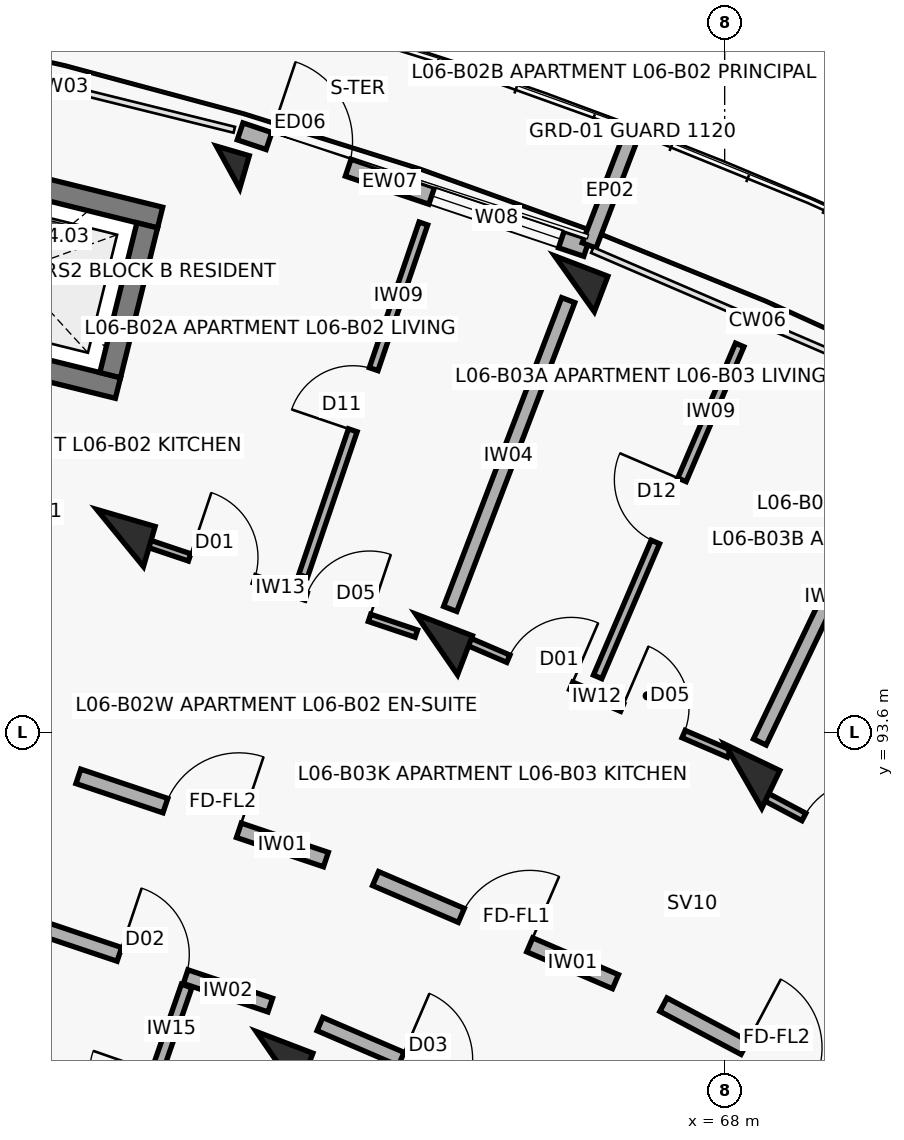
"""IFC4 building model, lengths in metres.
Left out: names, types, materials, properties, quantities, classifications, styles, units other than length and angle.
Written with IfcOpenShell. Run it as: python <this file> out.ifc"""

import sys

from ifc_helpers import new_model, si_unit, direction, frame, frame_2d, origin, origin_2d, place, context, subcontext, project, spatial, rectangle, extrude, element, fill, save


model = new_model("IFC4")
c1 = context("Model", 3, precision=1e-05, world=origin(), true_north=direction((0.0, 1.0)))
c2 = subcontext(c1, "Body", "Model", "MODEL_VIEW")
j1 = project(units=[si_unit("LENGTHUNIT", "METRE"), si_unit("PLANEANGLEUNIT", "RADIAN")], contexts=[c1])
p1 = place(None, origin())
s1 = spatial("IfcSite", under=j1, at=p1, CompositionType="ELEMENT")
p2 = place(p1, origin())
s2 = spatial("IfcBuilding", under=s1, at=p2, CompositionType="ELEMENT")
p3 = place(p2, frame((0.0, 0.0, 20.5)))
s3 = spatial("IfcBuildingStorey", under=s2, at=p3, CompositionType="ELEMENT", Elevation=20.5)
p4 = place(p3, frame((60.046, 96.153, 0.0), z_axis=(0.0, 0.0, 1.0), x_axis=(0.27966144946, 0.96009867914, 0.0)))
e1 = element("IfcColumn", 1, at=p4, inside=s3, PredefinedType="COLUMN", context=c2, shape_type="SweptSolid", body=[
    extrude(rectangle(XDim=0.55, YDim=0.8, at=origin_2d()), origin(), (0.0, 0.0, 1.0), 3.1),
])
p5 = place(p3, frame((61.467, 101.031, 0.0), z_axis=(0.0, 0.0, 1.0), x_axis=(0.27966144946, 0.96009867914, 0.0)))
e2 = element("IfcColumn", 2, at=p5, inside=s3, PredefinedType="COLUMN", context=c2, shape_type="SweptSolid", body=[
    extrude(rectangle(XDim=0.45, YDim=0.45, at=origin_2d()), origin(), (0.0, 0.0, 1.0), 3.1),
])
for number, where, z_axis, x_axis in (
    (3, (62.111, 89.261, 0.0), (0.0, 0.0, 1.0), (0.357, 0.934, 0.0)),
    (4, (64.21, 94.753, 0.0), (0.0, 0.0, 1.0), (0.357, 0.934, 0.0)),
):
    element("IfcColumn", number, at=place(p3, frame(where, z_axis=z_axis, x_axis=x_axis)), inside=s3, PredefinedType="COLUMN", context=c2, shape_type="SweptSolid", body=[
        extrude(rectangle(XDim=0.55, YDim=0.8, at=origin_2d()), origin(), (0.0, 0.0, 1.0), 3.1),
    ])
p6 = place(p3, frame((66.024, 99.499, 0.0), z_axis=(0.0, 0.0, 1.0), x_axis=(0.357064076459, 0.934079892355, 0.0)))
e5 = element("IfcColumn", 5, at=p6, inside=s3, PredefinedType="COLUMN", context=c2, shape_type="SweptSolid", body=[
    extrude(rectangle(XDim=0.5, YDim=0.75, at=origin_2d()), origin(), (0.0, 0.0, 1.0), 3.1),
])
p7 = place(p3, frame((68.246, 93.019, 0.0), z_axis=(0.0, 0.0, 1.0), x_axis=(0.432085748802, 0.901832526405, 0.0)))
e6 = element("IfcColumn", 6, at=p7, inside=s3, PredefinedType="COLUMN", context=c2, shape_type="SweptSolid", body=[
    extrude(rectangle(XDim=0.55, YDim=0.8, at=origin_2d()), origin(), (0.0, 0.0, 1.0), 3.1),
])
p8 = place(p3, frame((61.625, 101.504, 0.0), z_axis=(0.0, 0.0, 1.0), x_axis=(0.947867898788, -0.318663531717, 0.0)))
e7 = element("IfcWall", 7, at=p8, inside=s3, PredefinedType="SOLIDWALL", context=c2, shape_type="SweptSolid", body=[
    extrude(rectangle(XDim=4.809, YDim=0.235, at=frame_2d((2.405, 0.0))), origin(), (0.0, 0.0, 1.0), 2.25),
])
p9 = place(p8, frame((0.4, 0.0, 0.0)))
e8 = element("IfcOpeningElement", 8, at=p9, cuts=e7, PredefinedType="OPENING", context=c2, shape_type="SweptSolid", body=[
    extrude(rectangle(XDim=1.1, YDim=2.15, at=frame_2d((0.55, 1.075))), frame((0.0, 0.127, 0.0), z_axis=(0.0, -1.0, 0.0), x_axis=(1.0, 0.0, 0.0)), (0.0, 0.0, 1.0), 0.255),
])
p10 = place(p8, frame((2.659, 0.0, 0.35)))
e9 = element("IfcOpeningElement", 9, at=p10, cuts=e7, PredefinedType="OPENING", context=c2, shape_type="SweptSolid", body=[
    extrude(rectangle(XDim=1.8, YDim=1.65, at=frame_2d((0.9, 0.825))), frame((0.0, 0.127, 0.0), z_axis=(0.0, -1.0, 0.0), x_axis=(1.0, 0.0, 0.0)), (0.0, 0.0, 1.0), 0.255),
])
p11 = place(p3, frame((66.217, 100.003, 0.0), z_axis=(0.0, 0.0, 1.0), x_axis=(0.356957296461, 0.934120703391, 0.0)))
e10 = element("IfcWall", 10, at=p11, inside=s3, PredefinedType="PARAPET", context=c2, shape_type="SweptSolid", body=[
    extrude(rectangle(XDim=1.53, YDim=0.195, at=frame_2d((0.765, 0.0))), origin(), (0.0, 0.0, 1.0), 2.25),
])
p12 = place(p3, frame((60.018, 98.128, 0.0), z_axis=(0.0, 0.0, 1.0), x_axis=(-0.970707542441, 0.240264160972, 0.0)))
e11 = element("IfcWall", 11, at=p12, inside=s3, PredefinedType="SHEAR", context=c2, shape_type="SweptSolid", body=[
    extrude(rectangle(XDim=3.39, YDim=0.28, at=frame_2d((1.695, 0.0))), origin(), (0.0, 0.0, 1.0), 3.1),
])
p13 = place(p12, frame((1.095, 0.0, 0.0)))
e12 = element("IfcOpeningElement", 12, at=p13, cuts=e11, PredefinedType="OPENING", context=c2, shape_type="SweptSolid", body=[
    extrude(rectangle(XDim=1.2, YDim=2.15, at=frame_2d((0.6, 1.075))), frame((0.0, 0.15, 0.0), z_axis=(0.0, -1.0, 0.0), x_axis=(1.0, 0.0, 0.0)), (0.0, 0.0, 1.0), 0.3),
])
p14 = place(p3, frame((60.573, 100.37, 0.0), z_axis=(0.0, 0.0, 1.0), x_axis=(-0.970711699588, 0.240247364777, 0.0)))
e13 = element("IfcWall", 13, at=p14, inside=s3, PredefinedType="SHEAR", context=c2, shape_type="SweptSolid", body=[
    extrude(rectangle(XDim=3.39, YDim=0.28, at=frame_2d((1.695, 0.0))), origin(), (0.0, 0.0, 1.0), 3.1),
])
p15 = place(p3, frame((59.915, 98.297, 0.0), z_axis=(0.0, 0.0, 1.0), x_axis=(0.2402993748, 0.970698825832, 0.0)))
e14 = element("IfcWall", 14, at=p15, inside=s3, PredefinedType="SHEAR", context=c2, shape_type="SweptSolid", body=[
    extrude(rectangle(XDim=2.03, YDim=0.28, at=frame_2d((1.015, 0.0))), origin(), (0.0, 0.0, 1.0), 3.1),
])
p16 = place(p3, frame((59.497, 93.018, 0.0), z_axis=(0.0, 0.0, 1.0), x_axis=(0.947863007629, -0.318678080151, 0.0)))
e15 = element("IfcWall", 15, at=p16, inside=s3, PredefinedType="SOLIDWALL", context=c2, shape_type="SweptSolid", body=[
    extrude(rectangle(XDim=3.436, YDim=0.2, at=frame_2d((1.718, 0.0))), origin(), (0.0, 0.0, 1.0), 2.08),
])
p17 = place(p16, frame((1.208, 0.0, 0.0)))
e16 = element("IfcOpeningElement", 16, at=p17, cuts=e15, PredefinedType="OPENING", context=c2, shape_type="SweptSolid", body=[
    extrude(rectangle(XDim=1.02, YDim=2.15, at=frame_2d((0.51, 1.075))), frame((0.0, 0.11, 0.0), z_axis=(0.0, -1.0, 0.0), x_axis=(1.0, 0.0, 0.0)), (0.0, 0.0, 1.0), 0.22),
])
p18 = place(p3, frame((58.923, 91.049, 0.0), z_axis=(0.0, 0.0, 1.0), x_axis=(0.94787351033, -0.318646839643, 0.0)))
e17 = element("IfcWall", 17, at=p18, inside=s3, PredefinedType="SOLIDWALL", context=c2, shape_type="SweptSolid", body=[
    extrude(rectangle(XDim=3.269, YDim=0.19, at=frame_2d((1.634, 0.0))), origin(), (0.0, 0.0, 1.0), 2.08),
])
p19 = place(p18, frame((1.174, 0.0, 0.0)))
e18 = element("IfcOpeningElement", 18, at=p19, cuts=e17, PredefinedType="OPENING", context=c2, shape_type="SweptSolid", body=[
    extrude(rectangle(XDim=0.92, YDim=2.1, at=frame_2d((0.46, 1.05))), frame((0.0, 0.105, 0.0), z_axis=(0.0, -1.0, 0.0), x_axis=(1.0, 0.0, 0.0)), (0.0, 0.0, 1.0), 0.21),
])
p20 = place(p3, frame((59.837, 87.143, 0.0), z_axis=(0.0, 0.0, 1.0), x_axis=(0.328629662527, 0.944458863534, 0.0)))
e19 = element("IfcWall", 19, at=p20, inside=s3, PredefinedType="PARTITIONING", context=c2, shape_type="SweptSolid", body=[
    extrude(rectangle(XDim=3.3, YDim=0.145, at=frame_2d((1.65, 0.0))), origin(), (0.0, 0.0, 1.0), 2.08),
])
p21 = place(p20, frame((1.21, 0.0, 0.0)))
e20 = element("IfcOpeningElement", 20, at=p21, cuts=e19, PredefinedType="OPENING", context=c2, shape_type="SweptSolid", body=[
    extrude(rectangle(XDim=0.88, YDim=2.1, at=frame_2d((0.44, 1.05))), frame((0.0, 0.083, 0.0), z_axis=(0.0, -1.0, 0.0), x_axis=(1.0, 0.0, 0.0)), (0.0, 0.0, 1.0), 0.165),
])
p22 = place(p3, frame((60.344, 96.106, 0.0), z_axis=(0.0, 0.0, 1.0), x_axis=(0.947876567739, -0.318637744673, 0.0)))
e21 = element("IfcWall", 21, at=p22, inside=s3, PredefinedType="PARTITIONING", context=c2, shape_type="SweptSolid", body=[
    extrude(rectangle(XDim=3.797, YDim=0.1, at=frame_2d((1.899, 0.0))), origin(), (0.0, 0.0, 1.0), 2.08),
])
p23 = place(p22, frame((0.65, 0.0, 0.0)))
e22 = element("IfcOpeningElement", 22, at=p23, cuts=e21, PredefinedType="OPENING", context=c2, shape_type="SweptSolid", body=[
    extrude(rectangle(XDim=0.9, YDim=2.1, at=frame_2d((0.45, 1.05))), frame((0.0, 0.06, 0.0), z_axis=(0.0, -1.0, 0.0), x_axis=(1.0, 0.0, 0.0)), (0.0, 0.0, 1.0), 0.12),
])
p24 = place(p22, frame((2.267, 0.0, 0.0)))
e23 = element("IfcOpeningElement", 23, at=p24, cuts=e21, PredefinedType="OPENING", context=c2, shape_type="SweptSolid", body=[
    extrude(rectangle(XDim=0.88, YDim=2.1, at=frame_2d((0.44, 1.05))), frame((0.0, 0.06, 0.0), z_axis=(0.0, -1.0, 0.0), x_axis=(1.0, 0.0, 0.0)), (0.0, 0.0, 1.0), 0.12),
])
p25 = place(p3, frame((62.453, 95.655, 0.0), z_axis=(0.0, 0.0, 1.0), x_axis=(0.322916379302, 0.946427499589, 0.0)))
e24 = element("IfcWall", 24, at=p25, inside=s3, PredefinedType="PARTITIONING", context=c2, shape_type="SweptSolid", body=[
    extrude(rectangle(XDim=4.9, YDim=0.12, at=frame_2d((2.45, 0.0))), origin(), (0.0, 0.0, 1.0), 2.08),
])
p26 = place(p25, frame((2.025, 0.0, 0.0)))
e25 = element("IfcOpeningElement", 25, at=p26, cuts=e24, PredefinedType="OPENING", context=c2, shape_type="SweptSolid", body=[
    extrude(rectangle(XDim=0.85, YDim=2.1, at=frame_2d((0.425, 1.05))), frame((0.0, 0.07, 0.0), z_axis=(0.0, -1.0, 0.0), x_axis=(1.0, 0.0, 0.0)), (0.0, 0.0, 1.0), 0.14),
])
p27 = place(p3, frame((63.407, 91.673, 0.0), z_axis=(0.0, 0.0, 1.0), x_axis=(0.918718172399, -0.394913813008, 0.0)))
e26 = element("IfcWall", 26, at=p27, inside=s3, PredefinedType="SOLIDWALL", context=c2, shape_type="SweptSolid", body=[
    extrude(rectangle(XDim=3.436, YDim=0.2, at=frame_2d((1.718, 0.0))), origin(), (0.0, 0.0, 1.0), 2.08),
])
p28 = place(p27, frame((1.228, 0.0, 0.0)))
e27 = element("IfcOpeningElement", 27, at=p28, cuts=e26, PredefinedType="OPENING", context=c2, shape_type="SweptSolid", body=[
    extrude(rectangle(XDim=0.98, YDim=2.15, at=frame_2d((0.49, 1.075))), frame((0.0, 0.11, 0.0), z_axis=(0.0, -1.0, 0.0), x_axis=(1.0, 0.0, 0.0)), (0.0, 0.0, 1.0), 0.22),
])
p29 = place(p3, frame((62.675, 89.758, 0.0), z_axis=(0.0, 0.0, 1.0), x_axis=(0.918723391052, -0.394901672235, 0.0)))
e28 = element("IfcWall", 28, at=p29, inside=s3, PredefinedType="SOLIDWALL", context=c2, shape_type="SweptSolid", body=[
    extrude(rectangle(XDim=3.269, YDim=0.19, at=frame_2d((1.634, 0.0))), origin(), (0.0, 0.0, 1.0), 2.08),
])
p30 = place(p29, frame((1.164, 0.0, 0.0)))
e29 = element("IfcOpeningElement", 29, at=p30, cuts=e28, PredefinedType="OPENING", context=c2, shape_type="SweptSolid", body=[
    extrude(rectangle(XDim=0.94, YDim=2.1, at=frame_2d((0.47, 1.05))), frame((0.0, 0.105, 0.0), z_axis=(0.0, -1.0, 0.0), x_axis=(1.0, 0.0, 0.0)), (0.0, 0.0, 1.0), 0.21),
])
p31 = place(p3, frame((64.557, 94.822, 0.0), z_axis=(0.0, 0.0, 1.0), x_axis=(0.918726854017, -0.394893615684, 0.0)))
e30 = element("IfcWall", 30, at=p31, inside=s3, PredefinedType="PARTITIONING", context=c2, shape_type="SweptSolid", body=[
    extrude(rectangle(XDim=3.81, YDim=0.105, at=frame_2d((1.905, 0.0))), origin(), (0.0, 0.0, 1.0), 2.08),
])
p32 = place(p31, frame((0.65, 0.0, 0.0)))
e31 = element("IfcOpeningElement", 31, at=p32, cuts=e30, PredefinedType="OPENING", context=c2, shape_type="SweptSolid", body=[
    extrude(rectangle(XDim=0.9, YDim=2.1, at=frame_2d((0.45, 1.05))), frame((0.0, 0.062, 0.0), z_axis=(0.0, -1.0, 0.0), x_axis=(1.0, 0.0, 0.0)), (0.0, 0.0, 1.0), 0.125),
])
p33 = place(p31, frame((2.28, 0.0, 0.0)))
e32 = element("IfcOpeningElement", 32, at=p33, cuts=e30, PredefinedType="OPENING", context=c2, shape_type="SweptSolid", body=[
    extrude(rectangle(XDim=0.88, YDim=2.1, at=frame_2d((0.44, 1.05))), frame((0.0, 0.062, 0.0), z_axis=(0.0, -1.0, 0.0), x_axis=(1.0, 0.0, 0.0)), (0.0, 0.0, 1.0), 0.125),
])
p34 = place(p3, frame((66.329, 94.327, 0.0), z_axis=(0.0, 0.0, 1.0), x_axis=(0.393553279267, 0.919301809189, 0.0)))
e33 = element("IfcWall", 33, at=p34, inside=s3, PredefinedType="PARTITIONING", context=c2, shape_type="SweptSolid", body=[
    extrude(rectangle(XDim=4.75, YDim=0.12, at=frame_2d((2.375, 0.0))), origin(), (0.0, 0.0, 1.0), 2.08),
])
p35 = place(p34, frame((1.93, 0.0, 0.0)))
e34 = element("IfcOpeningElement", 34, at=p35, cuts=e33, PredefinedType="OPENING", context=c2, shape_type="SweptSolid", body=[
    extrude(rectangle(XDim=0.89, YDim=2.1, at=frame_2d((0.445, 1.05))), frame((0.0, 0.07, 0.0), z_axis=(0.0, -1.0, 0.0), x_axis=(1.0, 0.0, 0.0)), (0.0, 0.0, 1.0), 0.14),
])
p36 = place(p3, frame((64.389, 95.22, 0.0), z_axis=(0.0, 0.0, 1.0), x_axis=(0.357064016205, 0.934079915388, 0.0)))
e35 = element("IfcWall", 35, at=p36, inside=s3, PredefinedType="SOLIDWALL", context=c2, shape_type="SweptSolid", body=[
    extrude(rectangle(XDim=4.35, YDim=0.185, at=frame_2d((2.175, 0.0))), origin(), (0.0, 0.0, 1.0), 2.08),
])
p37 = place(p3, frame((67.194, 90.014, 0.0), z_axis=(0.0, 0.0, 1.0), x_axis=(0.883410853063, -0.468599258099, 0.0)))
e36 = element("IfcWall", 36, at=p37, inside=s3, PredefinedType="SOLIDWALL", context=c2, shape_type="SweptSolid", body=[
    extrude(rectangle(XDim=3.436, YDim=0.2, at=frame_2d((1.718, 0.0))), origin(), (0.0, 0.0, 1.0), 2.08),
])
p38 = place(p37, frame((1.208, 0.0, 0.0)))
e37 = element("IfcOpeningElement", 37, at=p38, cuts=e36, PredefinedType="OPENING", context=c2, shape_type="SweptSolid", body=[
    extrude(rectangle(XDim=1.02, YDim=2.15, at=frame_2d((0.51, 1.075))), frame((0.0, 0.11, 0.0), z_axis=(0.0, -1.0, 0.0), x_axis=(1.0, 0.0, 0.0)), (0.0, 0.0, 1.0), 0.22),
])
p39 = place(p3, frame((68.468, 92.788, 0.0), z_axis=(0.0, 0.0, 1.0), x_axis=(0.883450371448, -0.468524749814, 0.0)))
e38 = element("IfcWall", 38, at=p39, inside=s3, PredefinedType="PARTITIONING", context=c2, shape_type="SweptSolid", body=[
    extrude(rectangle(XDim=3.785, YDim=0.11, at=frame_2d((1.893, 0.0))), origin(), (0.0, 0.0, 1.0), 2.08),
])
p40 = place(p39, frame((0.65, 0.0, 0.0)))
e39 = element("IfcOpeningElement", 39, at=p40, cuts=e38, PredefinedType="OPENING", context=c2, shape_type="SweptSolid", body=[
    extrude(rectangle(XDim=0.9, YDim=2.1, at=frame_2d((0.45, 1.05))), frame((0.0, 0.065, 0.0), z_axis=(0.0, -1.0, 0.0), x_axis=(1.0, 0.0, 0.0)), (0.0, 0.0, 1.0), 0.13),
])
p41 = place(p39, frame((2.255, 0.0, 0.0)))
e40 = element("IfcOpeningElement", 40, at=p41, cuts=e38, PredefinedType="OPENING", context=c2, shape_type="SweptSolid", body=[
    extrude(rectangle(XDim=0.88, YDim=2.1, at=frame_2d((0.44, 1.05))), frame((0.0, 0.065, 0.0), z_axis=(0.0, -1.0, 0.0), x_axis=(1.0, 0.0, 0.0)), (0.0, 0.0, 1.0), 0.13),
])
p42 = place(p3, frame((68.462, 93.469, 0.0), z_axis=(0.0, 0.0, 1.0), x_axis=(0.432086898897, 0.901831975371, 0.0)))
e41 = element("IfcWall", 41, at=p42, inside=s3, PredefinedType="SOLIDWALL", context=c2, shape_type="SweptSolid", body=[
    extrude(rectangle(XDim=4.35, YDim=0.185, at=frame_2d((2.175, 0.0))), origin(), (0.0, 0.0, 1.0), 2.08),
])
p43 = place(p9, origin())
e42 = element("IfcDoor", 42, at=p43, inside=s3, OperationType="SINGLE_SWING_LEFT", PredefinedType="DOOR", context=c2, shape_type="SweptSolid", body=[
    extrude(rectangle(XDim=1.1, YDim=2.15, at=frame_2d((0.55, 1.075))), frame((0.0, 0.025, 0.0), z_axis=(0.0, -1.0, 0.0), x_axis=(1.0, 0.0, 0.0)), (0.0, 0.0, 1.0), 0.05),
])
fill(e8, e42)
p44 = place(p10, origin())
e43 = element("IfcWindow", 43, at=p44, inside=s3, PartitioningType="TRIPLE_PANEL_VERTICAL", PredefinedType="WINDOW", context=c2, shape_type="SweptSolid", body=[
    extrude(rectangle(XDim=1.8, YDim=1.65, at=frame_2d((0.9, 0.825))), frame((0.0, 0.03, 0.0), z_axis=(0.0, -1.0, 0.0), x_axis=(1.0, 0.0, 0.0)), (0.0, 0.0, 1.0), 0.06),
])
fill(e9, e43)
p45 = place(p17, origin())
e44 = element("IfcDoor", 44, at=p45, inside=s3, OperationType="SINGLE_SWING_RIGHT", PredefinedType="DOOR", context=c2, shape_type="SweptSolid", body=[
    extrude(rectangle(XDim=1.02, YDim=2.15, at=frame_2d((0.51, 1.075))), frame((0.0, 0.025, 0.0), z_axis=(0.0, -1.0, 0.0), x_axis=(1.0, 0.0, 0.0)), (0.0, 0.0, 1.0), 0.05),
])
fill(e16, e44)
p46 = place(p19, origin())
e45 = element("IfcDoor", 45, at=p46, inside=s3, OperationType="SINGLE_SWING_LEFT", PredefinedType="DOOR", context=c2, shape_type="SweptSolid", body=[
    extrude(rectangle(XDim=0.92, YDim=2.1, at=frame_2d((0.46, 1.05))), frame((0.0, 0.025, 0.0), z_axis=(0.0, -1.0, 0.0), x_axis=(1.0, 0.0, 0.0)), (0.0, 0.0, 1.0), 0.05),
])
fill(e18, e45)
p47 = place(p23, origin())
e46 = element("IfcDoor", 46, at=p47, inside=s3, OperationType="SINGLE_SWING_LEFT", PredefinedType="DOOR", context=c2, shape_type="SweptSolid", body=[
    extrude(rectangle(XDim=0.9, YDim=2.1, at=frame_2d((0.45, 1.05))), frame((0.0, 0.025, 0.0), z_axis=(0.0, -1.0, 0.0), x_axis=(1.0, 0.0, 0.0)), (0.0, 0.0, 1.0), 0.05),
])
fill(e22, e46)
p48 = place(p24, origin())
e47 = element("IfcDoor", 47, at=p48, inside=s3, OperationType="SINGLE_SWING_RIGHT", PredefinedType="DOOR", context=c2, shape_type="SweptSolid", body=[
    extrude(rectangle(XDim=0.88, YDim=2.1, at=frame_2d((0.44, 1.05))), frame((0.0, 0.025, 0.0), z_axis=(0.0, -1.0, 0.0), x_axis=(1.0, 0.0, 0.0)), (0.0, 0.0, 1.0), 0.05),
])
fill(e23, e47)
p49 = place(p26, origin())
e48 = element("IfcDoor", 48, at=p49, inside=s3, OperationType="SINGLE_SWING_LEFT", PredefinedType="DOOR", context=c2, shape_type="SweptSolid", body=[
    extrude(rectangle(XDim=0.85, YDim=2.1, at=frame_2d((0.425, 1.05))), frame((0.0, 0.025, 0.0), z_axis=(0.0, -1.0, 0.0), x_axis=(1.0, 0.0, 0.0)), (0.0, 0.0, 1.0), 0.05),
])
fill(e25, e48)
p50 = place(p28, origin())
e49 = element("IfcDoor", 49, at=p50, inside=s3, OperationType="SINGLE_SWING_RIGHT", PredefinedType="DOOR", context=c2, shape_type="SweptSolid", body=[
    extrude(rectangle(XDim=0.98, YDim=2.15, at=frame_2d((0.49, 1.075))), frame((0.0, 0.025, 0.0), z_axis=(0.0, -1.0, 0.0), x_axis=(1.0, 0.0, 0.0)), (0.0, 0.0, 1.0), 0.05),
])
fill(e27, e49)
p51 = place(p30, origin())
e50 = element("IfcDoor", 50, at=p51, inside=s3, OperationType="SINGLE_SWING_LEFT", PredefinedType="DOOR", context=c2, shape_type="SweptSolid", body=[
    extrude(rectangle(XDim=0.94, YDim=2.1, at=frame_2d((0.47, 1.05))), frame((0.0, 0.025, 0.0), z_axis=(0.0, -1.0, 0.0), x_axis=(1.0, 0.0, 0.0)), (0.0, 0.0, 1.0), 0.05),
])
fill(e29, e50)
p52 = place(p32, origin())
e51 = element("IfcDoor", 51, at=p52, inside=s3, OperationType="SINGLE_SWING_RIGHT", PredefinedType="DOOR", context=c2, shape_type="SweptSolid", body=[
    extrude(rectangle(XDim=0.9, YDim=2.1, at=frame_2d((0.45, 1.05))), frame((0.0, 0.025, 0.0), z_axis=(0.0, -1.0, 0.0), x_axis=(1.0, 0.0, 0.0)), (0.0, 0.0, 1.0), 0.05),
])
fill(e31, e51)
p53 = place(p33, origin())
e52 = element("IfcDoor", 52, at=p53, inside=s3, OperationType="SINGLE_SWING_LEFT", PredefinedType="DOOR", context=c2, shape_type="SweptSolid", body=[
    extrude(rectangle(XDim=0.88, YDim=2.1, at=frame_2d((0.44, 1.05))), frame((0.0, 0.025, 0.0), z_axis=(0.0, -1.0, 0.0), x_axis=(1.0, 0.0, 0.0)), (0.0, 0.0, 1.0), 0.05),
])
fill(e32, e52)
p54 = place(p35, origin())
e53 = element("IfcDoor", 53, at=p54, inside=s3, OperationType="SINGLE_SWING_RIGHT", PredefinedType="DOOR", context=c2, shape_type="SweptSolid", body=[
    extrude(rectangle(XDim=0.89, YDim=2.1, at=frame_2d((0.445, 1.05))), frame((0.0, 0.025, 0.0), z_axis=(0.0, -1.0, 0.0), x_axis=(1.0, 0.0, 0.0)), (0.0, 0.0, 1.0), 0.05),
])
fill(e34, e53)
p55 = place(p38, origin())
e54 = element("IfcDoor", 54, at=p55, inside=s3, OperationType="SINGLE_SWING_LEFT", PredefinedType="DOOR", context=c2, shape_type="SweptSolid", body=[
    extrude(rectangle(XDim=1.02, YDim=2.15, at=frame_2d((0.51, 1.075))), frame((0.0, 0.025, 0.0), z_axis=(0.0, -1.0, 0.0), x_axis=(1.0, 0.0, 0.0)), (0.0, 0.0, 1.0), 0.05),
])
fill(e37, e54)
p56 = place(p40, origin())
e55 = element("IfcDoor", 55, at=p56, inside=s3, OperationType="SINGLE_SWING_RIGHT", PredefinedType="DOOR", context=c2, shape_type="SweptSolid", body=[
    extrude(rectangle(XDim=0.9, YDim=2.1, at=frame_2d((0.45, 1.05))), frame((0.0, 0.025, 0.0), z_axis=(0.0, -1.0, 0.0), x_axis=(1.0, 0.0, 0.0)), (0.0, 0.0, 1.0), 0.05),
])
fill(e39, e55)
save(model, sys.argv[1])
